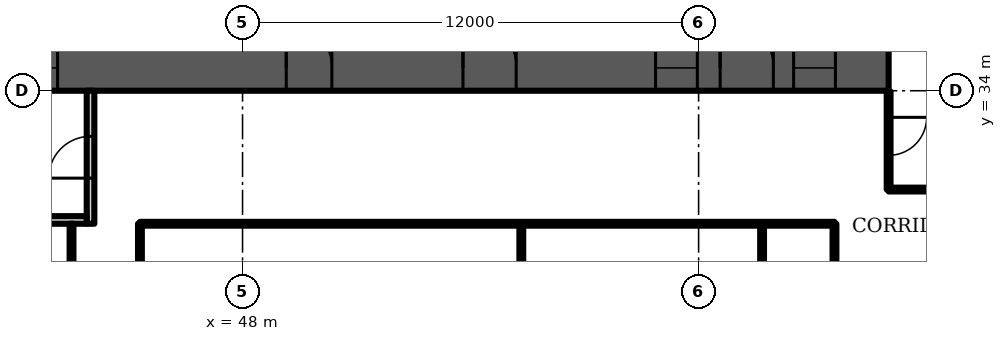
"""IFC4 building model, lengths in metres.
Left out: names, types, materials, properties, quantities, classifications, styles, units other than length and angle.
Written with IfcOpenShell. Run it as: python <this file> out.ifc"""

import sys

from ifc_helpers import new_model, si_unit, direction, frame, frame_2d, origin, place, context, subcontext, project, spatial, rectangle, extrude, element, fill, save


model = new_model("IFC4")
c1 = context("Model", 3, precision=1e-05, world=origin(), true_north=direction((0.0, 1.0)))
c2 = subcontext(c1, "Body", "Model", "MODEL_VIEW")
j1 = project(units=[si_unit("LENGTHUNIT", "METRE"), si_unit("PLANEANGLEUNIT", "RADIAN")], contexts=[c1])
p1 = place(None, origin())
s1 = spatial("IfcSite", under=j1, at=p1, CompositionType="ELEMENT")
p2 = place(p1, origin())
s2 = spatial("IfcBuilding", under=s1, at=p2, CompositionType="ELEMENT")
p3 = place(p2, frame((0.0, 0.0, 88.3)))
s3 = spatial("IfcBuildingStorey", under=s2, at=p3, CompositionType="ELEMENT", Elevation=88.3)
p4 = place(p3, frame((9.0, 34.6, 0.0), z_axis=(0.0, 0.0, 1.0), x_axis=(1.0, 0.0, 0.0)))
e1 = element("IfcWall", 1, at=p4, inside=s3, PredefinedType="SHEAR", context=c2, shape_type="SweptSolid", body=[
    extrude(rectangle(XDim=56.0, YDim=1.2, at=frame_2d((28.0, 0.0))), origin(), (0.0, 0.0, 1.0), 3.6),
])
p5 = place(p4, frame((2.0, 0.0, 0.0)))
e2 = element("IfcOpeningElement", 2, at=p5, cuts=e1, PredefinedType="OPENING", context=c2, shape_type="SweptSolid", body=[
    extrude(rectangle(XDim=1.0, YDim=2.1, at=frame_2d((0.5, 1.05))), frame((0.0, 0.61, 0.0), z_axis=(0.0, -1.0, 0.0), x_axis=(1.0, 0.0, 0.0)), (0.0, 0.0, 1.0), 1.22),
])
p6 = place(p4, frame((4.6, 0.0, 0.0)))
e3 = element("IfcOpeningElement", 3, at=p6, cuts=e1, PredefinedType="OPENING", context=c2, shape_type="SweptSolid", body=[
    extrude(rectangle(XDim=1.0, YDim=2.1, at=frame_2d((0.5, 1.05))), frame((0.0, 0.61, 0.0), z_axis=(0.0, -1.0, 0.0), x_axis=(1.0, 0.0, 0.0)), (0.0, 0.0, 1.0), 1.22),
])
p7 = place(p4, frame((7.867, 0.0, 0.0)))
e4 = element("IfcOpeningElement", 4, at=p7, cuts=e1, PredefinedType="OPENING", context=c2, shape_type="SweptSolid", body=[
    extrude(rectangle(XDim=1.1, YDim=2.1, at=frame_2d((0.55, 1.05))), frame((0.0, 0.61, 0.0), z_axis=(0.0, -1.0, 0.0), x_axis=(1.0, 0.0, 0.0)), (0.0, 0.0, 1.0), 1.22),
])
p8 = place(p4, frame((12.033, 0.0, 0.0)))
e5 = element("IfcOpeningElement", 5, at=p8, cuts=e1, PredefinedType="OPENING", context=c2, shape_type="SweptSolid", body=[
    extrude(rectangle(XDim=1.1, YDim=2.1, at=frame_2d((0.55, 1.05))), frame((0.0, 0.61, 0.0), z_axis=(0.0, -1.0, 0.0), x_axis=(1.0, 0.0, 0.0)), (0.0, 0.0, 1.0), 1.22),
])
p9 = place(p4, frame((9.8, 0.0, 0.0)))
e6 = element("IfcOpeningElement", 6, at=p9, cuts=e1, PredefinedType="OPENING", context=c2, shape_type="SweptSolid", body=[
    extrude(rectangle(XDim=1.4, YDim=2.1, at=frame_2d((0.7, 1.05))), frame((0.0, 0.61, 0.0), z_axis=(0.0, -1.0, 0.0), x_axis=(1.0, 0.0, 0.0)), (0.0, 0.0, 1.0), 1.22),
])
p10 = place(p4, frame((14.65, 0.0, 0.0)))
e7 = element("IfcOpeningElement", 7, at=p10, cuts=e1, PredefinedType="OPENING", context=c2, shape_type="SweptSolid", body=[
    extrude(rectangle(XDim=1.2, YDim=2.1, at=frame_2d((0.6, 1.05))), frame((0.0, 0.61, 0.0), z_axis=(0.0, -1.0, 0.0), x_axis=(1.0, 0.0, 0.0)), (0.0, 0.0, 1.0), 1.22),
])
p11 = place(p4, frame((21.867, 0.0, 0.0)))
e8 = element("IfcOpeningElement", 8, at=p11, cuts=e1, PredefinedType="OPENING", context=c2, shape_type="SweptSolid", body=[
    extrude(rectangle(XDim=1.1, YDim=2.1, at=frame_2d((0.55, 1.05))), frame((0.0, 0.61, 0.0), z_axis=(0.0, -1.0, 0.0), x_axis=(1.0, 0.0, 0.0)), (0.0, 0.0, 1.0), 1.22),
])
p12 = place(p4, frame((26.033, 0.0, 0.0)))
e9 = element("IfcOpeningElement", 9, at=p12, cuts=e1, PredefinedType="OPENING", context=c2, shape_type="SweptSolid", body=[
    extrude(rectangle(XDim=1.1, YDim=2.1, at=frame_2d((0.55, 1.05))), frame((0.0, 0.61, 0.0), z_axis=(0.0, -1.0, 0.0), x_axis=(1.0, 0.0, 0.0)), (0.0, 0.0, 1.0), 1.22),
])
p13 = place(p4, frame((23.8, 0.0, 0.0)))
e10 = element("IfcOpeningElement", 10, at=p13, cuts=e1, PredefinedType="OPENING", context=c2, shape_type="SweptSolid", body=[
    extrude(rectangle(XDim=1.4, YDim=2.1, at=frame_2d((0.7, 1.05))), frame((0.0, 0.61, 0.0), z_axis=(0.0, -1.0, 0.0), x_axis=(1.0, 0.0, 0.0)), (0.0, 0.0, 1.0), 1.22),
])
p14 = place(p4, frame((28.867, 0.0, 0.0)))
e11 = element("IfcOpeningElement", 11, at=p14, cuts=e1, PredefinedType="OPENING", context=c2, shape_type="SweptSolid", body=[
    extrude(rectangle(XDim=1.1, YDim=2.1, at=frame_2d((0.55, 1.05))), frame((0.0, 0.61, 0.0), z_axis=(0.0, -1.0, 0.0), x_axis=(1.0, 0.0, 0.0)), (0.0, 0.0, 1.0), 1.22),
])
p15 = place(p4, frame((33.033, 0.0, 0.0)))
e12 = element("IfcOpeningElement", 12, at=p15, cuts=e1, PredefinedType="OPENING", context=c2, shape_type="SweptSolid", body=[
    extrude(rectangle(XDim=1.1, YDim=2.1, at=frame_2d((0.55, 1.05))), frame((0.0, 0.61, 0.0), z_axis=(0.0, -1.0, 0.0), x_axis=(1.0, 0.0, 0.0)), (0.0, 0.0, 1.0), 1.22),
])
p16 = place(p4, frame((40.15, 0.0, 0.0)))
e13 = element("IfcOpeningElement", 13, at=p16, cuts=e1, PredefinedType="OPENING", context=c2, shape_type="SweptSolid", body=[
    extrude(rectangle(XDim=1.2, YDim=2.1, at=frame_2d((0.6, 1.05))), frame((0.0, 0.61, 0.0), z_axis=(0.0, -1.0, 0.0), x_axis=(1.0, 0.0, 0.0)), (0.0, 0.0, 1.0), 1.22),
])
p17 = place(p4, frame((44.8, 0.0, 0.0)))
e14 = element("IfcOpeningElement", 14, at=p17, cuts=e1, PredefinedType="OPENING", context=c2, shape_type="SweptSolid", body=[
    extrude(rectangle(XDim=1.4, YDim=2.1, at=frame_2d((0.7, 1.05))), frame((0.0, 0.61, 0.0), z_axis=(0.0, -1.0, 0.0), x_axis=(1.0, 0.0, 0.0)), (0.0, 0.0, 1.0), 1.22),
])
p18 = place(p4, frame((49.867, 0.0, 0.0)))
e15 = element("IfcOpeningElement", 15, at=p18, cuts=e1, PredefinedType="OPENING", context=c2, shape_type="SweptSolid", body=[
    extrude(rectangle(XDim=1.1, YDim=2.1, at=frame_2d((0.55, 1.05))), frame((0.0, 0.61, 0.0), z_axis=(0.0, -1.0, 0.0), x_axis=(1.0, 0.0, 0.0)), (0.0, 0.0, 1.0), 1.22),
])
p19 = place(p4, frame((53.5, 0.0, 0.0)))
e16 = element("IfcOpeningElement", 16, at=p19, cuts=e1, PredefinedType="OPENING", context=c2, shape_type="SweptSolid", body=[
    extrude(rectangle(XDim=1.1, YDim=2.1, at=frame_2d((0.55, 1.05))), frame((0.0, 0.61, 0.0), z_axis=(0.0, -1.0, 0.0), x_axis=(1.0, 0.0, 0.0)), (0.0, 0.0, 1.0), 1.22),
])
p20 = place(p4, frame((51.567, 0.0, 0.0)))
e17 = element("IfcOpeningElement", 17, at=p20, cuts=e1, PredefinedType="OPENING", context=c2, shape_type="SweptSolid", body=[
    extrude(rectangle(XDim=1.4, YDim=2.1, at=frame_2d((0.7, 1.05))), frame((0.0, 0.61, 0.0), z_axis=(0.0, -1.0, 0.0), x_axis=(1.0, 0.0, 0.0)), (0.0, 0.0, 1.0), 1.22),
])
p21 = place(p3, frame((44.0, 30.5, 0.0), z_axis=(0.0, 0.0, 1.0), x_axis=(0.0, 1.0, 0.0)))
e18 = element("IfcWall", 18, at=p21, inside=s3, PredefinedType="PARTITIONING", context=c2, shape_type="SweptSolid", body=[
    extrude(rectangle(XDim=3.5, YDim=0.2, at=frame_2d((1.75, 0.0))), origin(), (0.0, 0.0, 1.0), 3.15),
])
p22 = place(p21, frame((1.2, 0.0, 0.0)))
e19 = element("IfcOpeningElement", 19, at=p22, cuts=e18, PredefinedType="OPENING", context=c2, shape_type="SweptSolid", body=[
    extrude(rectangle(XDim=1.1, YDim=2.1, at=frame_2d((0.55, 1.05))), frame((0.0, 0.11, 0.0), z_axis=(0.0, -1.0, 0.0), x_axis=(1.0, 0.0, 0.0)), (0.0, 0.0, 1.0), 0.22),
])
p23 = place(p3, frame((41.1, 30.6, 0.0), z_axis=(0.0, 0.0, 1.0), x_axis=(1.0, 0.0, 0.0)))
e20 = element("IfcWall", 20, at=p23, inside=s3, PredefinedType="PARTITIONING", context=c2, shape_type="SweptSolid", body=[
    extrude(rectangle(XDim=2.8, YDim=0.2, at=frame_2d((1.4, 0.0))), origin(), (0.0, 0.0, 1.0), 3.15),
])
p24 = place(p3, frame((43.5, 14.93, 0.0), z_axis=(0.0, 0.0, 1.0), x_axis=(0.0, 1.0, 0.0)))
e21 = element("IfcWall", 21, at=p24, inside=s3, PredefinedType="PARTITIONING", context=c2, shape_type="SweptSolid", body=[
    extrude(rectangle(XDim=15.57, YDim=0.1, at=frame_2d((7.785, 0.0))), origin(), (0.0, 0.0, 1.0), 3.15),
])
p25 = place(p24, frame((2.45, 0.0, 0.0)))
e22 = element("IfcOpeningElement", 22, at=p25, cuts=e21, PredefinedType="OPENING", context=c2, shape_type="SweptSolid", body=[
    extrude(rectangle(XDim=1.8, YDim=2.1, at=frame_2d((0.9, 1.05))), frame((0.0, 0.06, 0.0), z_axis=(0.0, -1.0, 0.0), x_axis=(1.0, 0.0, 0.0)), (0.0, 0.0, 1.0), 0.12),
])
p26 = place(p3, frame((45.3, 14.93, 0.0), z_axis=(0.0, 0.0, 1.0), x_axis=(0.0, 1.0, 0.0)))
e23 = element("IfcWall", 23, at=p26, inside=s3, PredefinedType="PARTITIONING", context=c2, shape_type="SweptSolid", body=[
    extrude(rectangle(XDim=15.57, YDim=0.1, at=frame_2d((7.785, 0.0))), origin(), (0.0, 0.0, 1.0), 3.15),
])
p27 = place(p26, frame((1.785, 0.0, 0.0)))
e24 = element("IfcOpeningElement", 24, at=p27, cuts=e23, PredefinedType="OPENING", context=c2, shape_type="SweptSolid", body=[
    extrude(rectangle(XDim=1.8, YDim=2.1, at=frame_2d((0.9, 1.05))), frame((0.0, 0.06, 0.0), z_axis=(0.0, -1.0, 0.0), x_axis=(1.0, 0.0, 0.0)), (0.0, 0.0, 1.0), 0.12),
])
p28 = place(p3, frame((45.3, 30.5, 0.0), z_axis=(0.0, 0.0, 1.0), x_axis=(1.0, 0.0, 0.0)))
e25 = element("IfcWall", 25, at=p28, inside=s3, PredefinedType="PARTITIONING", context=c2, shape_type="SweptSolid", body=[
    extrude(rectangle(XDim=18.275, YDim=0.1, at=frame_2d((9.137, 0.0))), origin(), (0.0, 0.0, 1.0), 3.15),
])
for number, where, z_axis, x_axis in (
    (26, (55.335, 14.93, 0.0), (0.0, 0.0, 1.0), (0.0, 1.0, 0.0)),
    (27, (61.67, 14.93, 0.0), (0.0, 0.0, 1.0), (0.0, 1.0, 0.0)),
):
    element("IfcWall", number, at=place(p3, frame(where, z_axis=z_axis, x_axis=x_axis)), inside=s3, PredefinedType="PARTITIONING", context=c2, shape_type="SweptSolid", body=[
        extrude(rectangle(XDim=15.57, YDim=0.1, at=frame_2d((7.785, 0.0))), origin(), (0.0, 0.0, 1.0), 3.15),
    ])
p29 = place(p3, frame((63.575, 29.075, 0.0), z_axis=(0.0, 0.0, 1.0), x_axis=(0.0, 1.0, 0.0)))
e28 = element("IfcWall", 28, at=p29, inside=s3, PredefinedType="PARTITIONING", context=c2, shape_type="SweptSolid", body=[
    extrude(rectangle(XDim=1.425, YDim=0.1, at=frame_2d((0.712, 0.0))), origin(), (0.0, 0.0, 1.0), 3.15),
])
p30 = place(p3, frame((65.0, 31.4, 0.0), z_axis=(0.0, 0.0, 1.0), x_axis=(0.0, 1.0, 0.0)))
e29 = element("IfcWall", 29, at=p30, inside=s3, PredefinedType="PARTITIONING", context=c2, shape_type="SweptSolid", body=[
    extrude(rectangle(XDim=2.58, YDim=0.1, at=frame_2d((1.29, 0.0))), origin(), (0.0, 0.0, 1.0), 3.15),
])
p31 = place(p30, frame((0.9, 0.0, 0.0)))
e30 = element("IfcOpeningElement", 30, at=p31, cuts=e29, PredefinedType="OPENING", context=c2, shape_type="SweptSolid", body=[
    extrude(rectangle(XDim=1.0, YDim=2.1, at=frame_2d((0.5, 1.05))), frame((0.0, 0.06, 0.0), z_axis=(0.0, -1.0, 0.0), x_axis=(1.0, 0.0, 0.0)), (0.0, 0.0, 1.0), 0.12),
])
p32 = place(p3, frame((65.0, 31.4, 0.0), z_axis=(0.0, 0.0, 1.0), x_axis=(1.0, 0.0, 0.0)))
e31 = element("IfcWall", 31, at=p32, inside=s3, PredefinedType="PARTITIONING", context=c2, shape_type="SweptSolid", body=[
    extrude(rectangle(XDim=7.125, YDim=0.1, at=frame_2d((3.562, 0.0))), origin(), (0.0, 0.0, 1.0), 3.15),
])
p33 = place(p32, frame((5.705, 0.0, 0.0)))
e32 = element("IfcOpeningElement", 32, at=p33, cuts=e31, PredefinedType="OPENING", context=c2, shape_type="SweptSolid", body=[
    extrude(rectangle(XDim=1.0, YDim=2.1, at=frame_2d((0.5, 1.05))), frame((0.0, 0.06, 0.0), z_axis=(0.0, -1.0, 0.0), x_axis=(1.0, 0.0, 0.0)), (0.0, 0.0, 1.0), 0.12),
])
p34 = place(p15, origin())
e33 = element("IfcDoor", 33, at=p34, inside=s3, OperationType="DOUBLE_DOOR_SLIDING", PredefinedType="DOOR", context=c2, shape_type="SweptSolid", body=[
    extrude(rectangle(XDim=1.1, YDim=2.1, at=frame_2d((0.55, 1.05))), frame((0.0, 0.025, 0.0), z_axis=(0.0, -1.0, 0.0), x_axis=(1.0, 0.0, 0.0)), (0.0, 0.0, 1.0), 0.05),
])
fill(e12, e33)
p35 = place(p16, origin())
e34 = element("IfcDoor", 34, at=p35, inside=s3, OperationType="SINGLE_SWING_LEFT", PredefinedType="DOOR", context=c2, shape_type="SweptSolid", body=[
    extrude(rectangle(XDim=1.2, YDim=2.1, at=frame_2d((0.6, 1.05))), frame((0.0, 0.025, 0.0), z_axis=(0.0, -1.0, 0.0), x_axis=(1.0, 0.0, 0.0)), (0.0, 0.0, 1.0), 0.05),
])
fill(e13, e34)
p36 = place(p17, origin())
e35 = element("IfcDoor", 35, at=p36, inside=s3, OperationType="DOUBLE_DOOR_SINGLE_SWING", PredefinedType="DOOR", context=c2, shape_type="SweptSolid", body=[
    extrude(rectangle(XDim=1.4, YDim=2.1, at=frame_2d((0.7, 1.05))), frame((0.0, 0.025, 0.0), z_axis=(0.0, -1.0, 0.0), x_axis=(1.0, 0.0, 0.0)), (0.0, 0.0, 1.0), 0.05),
])
fill(e14, e35)
p37 = place(p18, origin())
e36 = element("IfcDoor", 36, at=p37, inside=s3, OperationType="DOUBLE_DOOR_SLIDING", PredefinedType="DOOR", context=c2, shape_type="SweptSolid", body=[
    extrude(rectangle(XDim=1.1, YDim=2.1, at=frame_2d((0.55, 1.05))), frame((0.0, 0.025, 0.0), z_axis=(0.0, -1.0, 0.0), x_axis=(1.0, 0.0, 0.0)), (0.0, 0.0, 1.0), 0.05),
])
fill(e15, e36)
p38 = place(p19, origin())
e37 = element("IfcDoor", 37, at=p38, inside=s3, OperationType="DOUBLE_DOOR_SLIDING", PredefinedType="DOOR", context=c2, shape_type="SweptSolid", body=[
    extrude(rectangle(XDim=1.1, YDim=2.1, at=frame_2d((0.55, 1.05))), frame((0.0, 0.025, 0.0), z_axis=(0.0, -1.0, 0.0), x_axis=(1.0, 0.0, 0.0)), (0.0, 0.0, 1.0), 0.05),
])
fill(e16, e37)
p39 = place(p20, origin())
e38 = element("IfcDoor", 38, at=p39, inside=s3, OperationType="DOUBLE_DOOR_SINGLE_SWING", PredefinedType="DOOR", context=c2, shape_type="SweptSolid", body=[
    extrude(rectangle(XDim=1.4, YDim=2.1, at=frame_2d((0.7, 1.05))), frame((0.0, 0.025, 0.0), z_axis=(0.0, -1.0, 0.0), x_axis=(1.0, 0.0, 0.0)), (0.0, 0.0, 1.0), 0.05),
])
fill(e17, e38)
p40 = place(p22, origin())
e39 = element("IfcDoor", 39, at=p40, inside=s3, OperationType="SINGLE_SWING_LEFT", PredefinedType="DOOR", context=c2, shape_type="SweptSolid", body=[
    extrude(rectangle(XDim=1.1, YDim=2.1, at=frame_2d((0.55, 1.05))), frame((0.0, 0.025, 0.0), z_axis=(0.0, -1.0, 0.0), x_axis=(1.0, 0.0, 0.0)), (0.0, 0.0, 1.0), 0.05),
])
fill(e19, e39)
p41 = place(p31, origin())
e40 = element("IfcDoor", 40, at=p41, inside=s3, OperationType="SINGLE_SWING_RIGHT", PredefinedType="DOOR", context=c2, shape_type="SweptSolid", body=[
    extrude(rectangle(XDim=1.0, YDim=2.1, at=frame_2d((0.5, 1.05))), frame((0.0, 0.025, 0.0), z_axis=(0.0, -1.0, 0.0), x_axis=(1.0, 0.0, 0.0)), (0.0, 0.0, 1.0), 0.05),
])
fill(e30, e40)
save(model, sys.argv[1])
